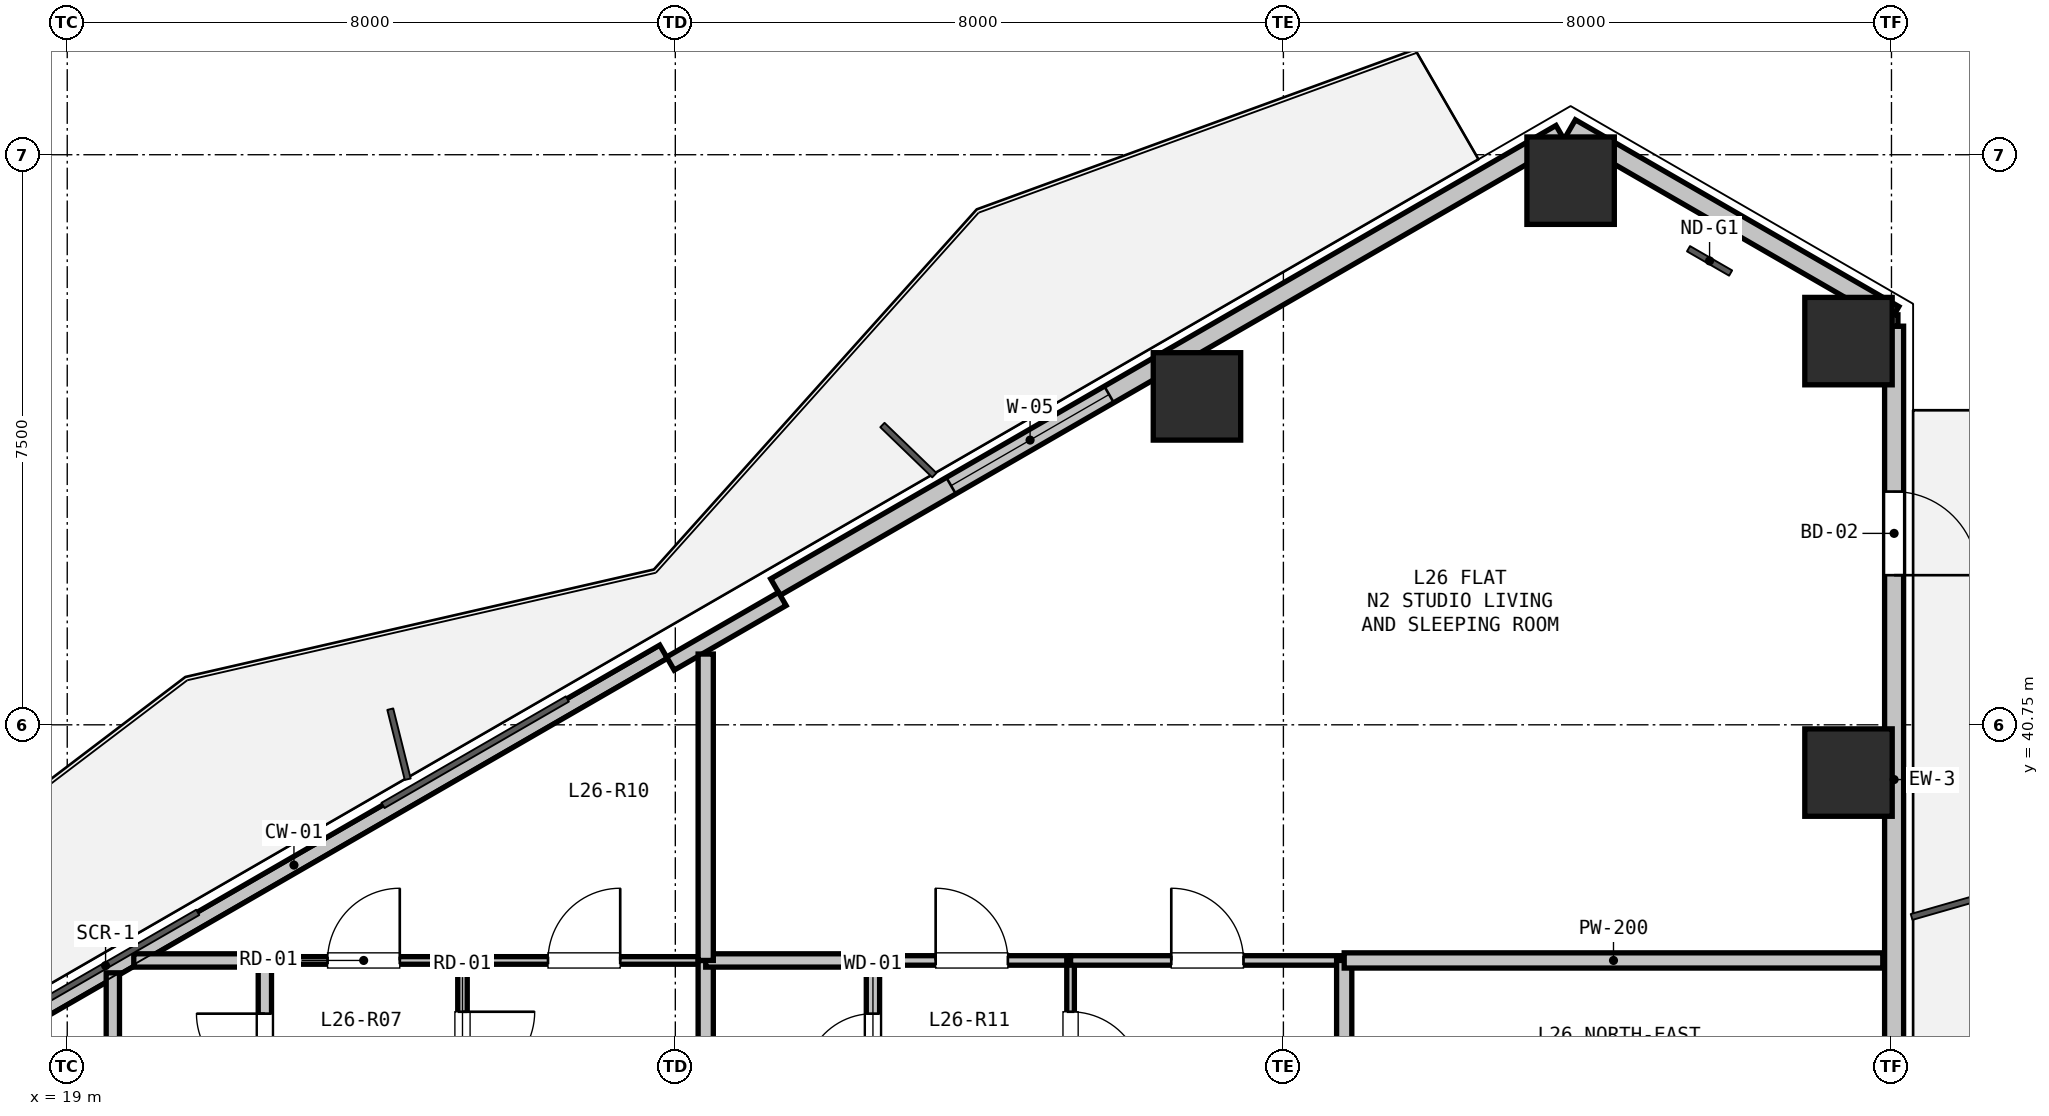
"""IFC4 building model, lengths in metres.
Left out: names, types, materials, properties, quantities, classifications, styles, units other than length and angle.
Written with IfcOpenShell. Run it as: python <this file> out.ifc"""

import sys

from ifc_helpers import new_model, si_unit, direction, frame, frame_2d, origin, origin_2d, place, context, subcontext, project, spatial, rectangle, hollow_rectangle, extrude, element, fill, save


model = new_model("IFC4")
c1 = context("Model", 3, precision=1e-05, world=origin(), true_north=direction((0.0, 1.0)))
c2 = subcontext(c1, "Body", "Model", "MODEL_VIEW")
j1 = project(units=[si_unit("LENGTHUNIT", "METRE"), si_unit("PLANEANGLEUNIT", "RADIAN")], contexts=[c1])
p1 = place(None, origin())
s1 = spatial("IfcSite", under=j1, at=p1, CompositionType="ELEMENT")
p2 = place(p1, origin())
s2 = spatial("IfcBuilding", under=s1, at=p2, CompositionType="ELEMENT")
p3 = place(p2, frame((0.0, 0.0, 96.6)))
s3 = spatial("IfcBuildingStorey", under=s2, at=p3, CompositionType="ELEMENT", Elevation=96.6)
for number, where, z_axis, x_axis in (
    (1, (33.863, 45.071, 0.0), (0.0, 0.0, 1.0), (1.0, 0.0, 0.0)),
    (2, (38.779, 47.909, 0.0), (0.0, 0.0, 1.0), (1.0, 0.0, 0.0)),
    (3, (42.435, 45.798, 0.0), (0.0, 0.0, 1.0), (1.0, 0.0, 0.0)),
    (4, (42.435, 40.122, 0.0), (0.0, 0.0, 1.0), (1.0, 0.0, 0.0)),
):
    element("IfcColumn", number, at=place(p3, frame(where, z_axis=z_axis, x_axis=x_axis)), inside=s3, PredefinedType="COLUMN", context=c2, shape_type="SweptSolid", body=[
        extrude(hollow_rectangle(XDim=1.15, YDim=1.15, WallThickness=0.032, at=origin_2d()), origin(), (0.0, 0.0, 1.0), 3.3),
    ])
p4 = place(p3, frame((38.779, 48.602, 0.0), z_axis=(0.0, 0.0, 1.0), x_axis=(0.866011848704, -0.500023477353, 0.0)))
e5 = element("IfcWall", 5, at=p4, inside=s3, PredefinedType="SOLIDWALL", context=c2, shape_type="SweptSolid", body=[
    extrude(rectangle(XDim=4.914, YDim=0.25, at=frame_2d((2.457, 0.0))), origin(), (0.0, 0.0, 1.0), 2.67),
])
p5 = place(p3, frame((17.12, 36.097, 0.0), z_axis=(0.0, 0.0, 1.0), x_axis=(0.866027010039, 0.499997217876, 0.0)))
e6 = element("IfcWall", 6, at=p5, inside=s3, PredefinedType="PARAPET", context=c2, shape_type="SweptSolid", body=[
    extrude(rectangle(XDim=11.229, YDim=0.2, at=frame_2d((5.615, 0.0))), origin(), (0.0, 0.0, 1.0), 0.2),
])
p6 = place(p3, frame((28.317, 42.562, 0.0), z_axis=(0.0, 0.0, 1.0), x_axis=(0.866023023012, 0.500004123596, 0.0)))
e7 = element("IfcWall", 7, at=p6, inside=s3, PredefinedType="SOLIDWALL", context=c2, shape_type="SweptSolid", body=[
    extrude(rectangle(XDim=11.93, YDim=0.25, at=frame_2d((5.965, 0.0))), origin(), (0.0, 0.0, 1.0), 2.67),
])
p7 = place(p6, frame((2.668, 0.0, 0.9)))
e8 = element("IfcOpeningElement", 8, at=p7, cuts=e7, PredefinedType="OPENING", context=c2, shape_type="SweptSolid", body=[
    extrude(rectangle(XDim=2.4, YDim=1.6, at=frame_2d((1.2, 0.8))), frame((0.0, 0.135, 0.0), z_axis=(0.0, -1.0, 0.0), x_axis=(1.0, 0.0, 0.0)), (0.0, 0.0, 1.0), 0.27),
])
p8 = place(p3, frame((26.935, 41.556, 0.0), z_axis=(0.0, 0.0, 1.0), x_axis=(0.86605165483, 0.499954529098, 0.0)))
e9 = element("IfcWall", 9, at=p8, inside=s3, PredefinedType="PARAPET", context=c2, shape_type="SweptSolid", body=[
    extrude(rectangle(XDim=1.7, YDim=0.2, at=frame_2d((0.85, 0.0))), origin(), (0.0, 0.0, 1.0), 2.67),
])
p9 = place(p3, frame((43.035, 45.994, 0.0), z_axis=(0.0, 0.0, 1.0), x_axis=(0.0, -1.0, 0.0)))
e10 = element("IfcWall", 10, at=p9, inside=s3, PredefinedType="SOLIDWALL", context=c2, shape_type="SweptSolid", body=[
    extrude(rectangle(XDim=11.93, YDim=0.25, at=frame_2d((5.965, 0.0))), origin(), (0.0, 0.0, 1.0), 2.67),
])
p10 = place(p9, frame((2.176, 0.0, 0.0)))
e11 = element("IfcOpeningElement", 11, at=p10, cuts=e10, PredefinedType="OPENING", context=c2, shape_type="SweptSolid", body=[
    extrude(rectangle(XDim=1.1, YDim=2.1, at=frame_2d((0.55, 1.05))), frame((0.0, 0.135, 0.0), z_axis=(0.0, -1.0, 0.0), x_axis=(1.0, 0.0, 0.0)), (0.0, 0.0, 1.0), 0.27),
])
p11 = place(p3, frame((21.6, 37.65, 0.0), z_axis=(0.0, 0.0, 1.0), x_axis=(1.0, 0.0, 0.0)))
e12 = element("IfcWall", 12, at=p11, inside=s3, PredefinedType="PARTITIONING", context=c2, shape_type="SweptSolid", body=[
    extrude(rectangle(XDim=2.6, YDim=0.1, at=frame_2d((1.3, 0.0))), origin(), (0.0, 0.0, 1.0), 3.05),
])
p12 = place(p11, frame((0.825, 0.0, 0.0)))
e13 = element("IfcOpeningElement", 13, at=p12, cuts=e12, PredefinedType="OPENING", context=c2, shape_type="SweptSolid", body=[
    extrude(rectangle(XDim=0.95, YDim=2.1, at=frame_2d((0.475, 1.05))), frame((0.0, 0.06, 0.0), z_axis=(0.0, -1.0, 0.0), x_axis=(1.0, 0.0, 0.0)), (0.0, 0.0, 1.0), 0.12),
])
p13 = place(p3, frame((24.2, 37.65, 0.0), z_axis=(0.0, 0.0, 1.0), x_axis=(0.0, -1.0, 0.0)))
e14 = element("IfcWall", 14, at=p13, inside=s3, PredefinedType="PARTITIONING", context=c2, shape_type="SweptSolid", body=[
    extrude(rectangle(XDim=2.3, YDim=0.125, at=frame_2d((1.15, 0.0))), origin(), (0.0, 0.0, 1.0), 3.05),
])
p14 = place(p13, frame((0.675, 0.0, 0.0)))
e15 = element("IfcOpeningElement", 15, at=p14, cuts=e14, PredefinedType="OPENING", context=c2, shape_type="SweptSolid", body=[
    extrude(rectangle(XDim=0.95, YDim=2.1, at=frame_2d((0.475, 1.05))), frame((0.0, 0.073, 0.0), z_axis=(0.0, -1.0, 0.0), x_axis=(1.0, 0.0, 0.0)), (0.0, 0.0, 1.0), 0.145),
])
p15 = place(p3, frame((21.6, 35.35, 0.0), z_axis=(0.0, 0.0, 1.0), x_axis=(0.0, 1.0, 0.0)))
e16 = element("IfcWall", 16, at=p15, inside=s3, PredefinedType="PLUMBINGWALL", context=c2, shape_type="SweptSolid", body=[
    extrude(rectangle(XDim=2.3, YDim=0.175, at=frame_2d((1.15, 0.0))), origin(), (0.0, 0.0, 1.0), 3.05),
])
p16 = place(p15, frame((0.7, 0.0, 0.0)))
e17 = element("IfcOpeningElement", 17, at=p16, cuts=e16, PredefinedType="OPENING", context=c2, shape_type="SweptSolid", body=[
    extrude(rectangle(XDim=0.9, YDim=2.1, at=frame_2d((0.45, 1.05))), frame((0.0, 0.097, 0.0), z_axis=(0.0, -1.0, 0.0), x_axis=(1.0, 0.0, 0.0)), (0.0, 0.0, 1.0), 0.195),
])
p17 = place(p3, frame((29.6, 37.65, 0.0), z_axis=(0.0, 0.0, 1.0), x_axis=(1.0, 0.0, 0.0)))
e18 = element("IfcWall", 18, at=p17, inside=s3, PredefinedType="PARTITIONING", context=c2, shape_type="SweptSolid", body=[
    extrude(rectangle(XDim=2.6, YDim=0.125, at=frame_2d((1.3, 0.0))), origin(), (0.0, 0.0, 1.0), 3.05),
])
p18 = place(p17, frame((0.825, 0.0, 0.0)))
e19 = element("IfcOpeningElement", 19, at=p18, cuts=e18, PredefinedType="OPENING", context=c2, shape_type="SweptSolid", body=[
    extrude(rectangle(XDim=0.95, YDim=2.1, at=frame_2d((0.475, 1.05))), frame((0.0, 0.073, 0.0), z_axis=(0.0, -1.0, 0.0), x_axis=(1.0, 0.0, 0.0)), (0.0, 0.0, 1.0), 0.145),
])
p19 = place(p3, frame((32.2, 37.65, 0.0), z_axis=(0.0, 0.0, 1.0), x_axis=(0.0, -1.0, 0.0)))
e20 = element("IfcWall", 20, at=p19, inside=s3, PredefinedType="PARTITIONING", context=c2, shape_type="SweptSolid", body=[
    extrude(rectangle(XDim=2.3, YDim=0.1, at=frame_2d((1.15, 0.0))), origin(), (0.0, 0.0, 1.0), 3.05),
])
p20 = place(p19, frame((0.675, 0.0, 0.0)))
e21 = element("IfcOpeningElement", 21, at=p20, cuts=e20, PredefinedType="OPENING", context=c2, shape_type="SweptSolid", body=[
    extrude(rectangle(XDim=0.95, YDim=2.1, at=frame_2d((0.475, 1.05))), frame((0.0, 0.06, 0.0), z_axis=(0.0, -1.0, 0.0), x_axis=(1.0, 0.0, 0.0)), (0.0, 0.0, 1.0), 0.12),
])
p21 = place(p3, frame((29.6, 35.35, 0.0), z_axis=(0.0, 0.0, 1.0), x_axis=(0.0, 1.0, 0.0)))
e22 = element("IfcWall", 22, at=p21, inside=s3, PredefinedType="PLUMBINGWALL", context=c2, shape_type="SweptSolid", body=[
    extrude(rectangle(XDim=2.3, YDim=0.175, at=frame_2d((1.15, 0.0))), origin(), (0.0, 0.0, 1.0), 3.05),
])
p22 = place(p21, frame((0.7, 0.0, 0.0)))
e23 = element("IfcOpeningElement", 23, at=p22, cuts=e22, PredefinedType="OPENING", context=c2, shape_type="SweptSolid", body=[
    extrude(rectangle(XDim=0.9, YDim=2.1, at=frame_2d((0.45, 1.05))), frame((0.0, 0.097, 0.0), z_axis=(0.0, -1.0, 0.0), x_axis=(1.0, 0.0, 0.0)), (0.0, 0.0, 1.0), 0.195),
])
p23 = place(p3, frame((19.6, 35.35, 0.0), z_axis=(0.0, 0.0, 1.0), x_axis=(0.0, 1.0, 0.0)))
e24 = element("IfcWall", 24, at=p23, inside=s3, PredefinedType="PLUMBINGWALL", context=c2, shape_type="SweptSolid", body=[
    extrude(rectangle(XDim=2.137, YDim=0.175, at=frame_2d((1.068, 0.0))), origin(), (0.0, 0.0, 1.0), 2.365),
])
p24 = place(p3, frame((19.875, 37.65, 0.0), z_axis=(0.0, 0.0, 1.0), x_axis=(1.0, 0.0, 0.0)))
e25 = element("IfcWall", 25, at=p24, inside=s3, PredefinedType="PLUMBINGWALL", context=c2, shape_type="SweptSolid", body=[
    extrude(rectangle(XDim=1.725, YDim=0.175, at=frame_2d((0.862, 0.0))), origin(), (0.0, 0.0, 1.0), 2.365),
])
p25 = place(p3, frame((24.2, 37.65, 0.0), z_axis=(0.0, 0.0, 1.0), x_axis=(1.0, 0.0, 0.0)))
e26 = element("IfcWall", 26, at=p25, inside=s3, PredefinedType="PARTITIONING", context=c2, shape_type="SweptSolid", body=[
    extrude(rectangle(XDim=3.2, YDim=0.1, at=frame_2d((1.6, 0.0))), origin(), (0.0, 0.0, 1.0), 3.05),
])
p26 = place(p25, frame((1.125, 0.0, 0.0)))
e27 = element("IfcOpeningElement", 27, at=p26, cuts=e26, PredefinedType="OPENING", context=c2, shape_type="SweptSolid", body=[
    extrude(rectangle(XDim=0.95, YDim=2.1, at=frame_2d((0.475, 1.05))), frame((0.0, 0.06, 0.0), z_axis=(0.0, -1.0, 0.0), x_axis=(1.0, 0.0, 0.0)), (0.0, 0.0, 1.0), 0.12),
])
p27 = place(p3, frame((27.4, 37.65, 0.0), z_axis=(0.0, 0.0, 1.0), x_axis=(0.0, -1.0, 0.0)))
e28 = element("IfcWall", 28, at=p27, inside=s3, PredefinedType="PARTITIONING", context=c2, shape_type="SweptSolid", body=[
    extrude(rectangle(XDim=2.3, YDim=0.2, at=frame_2d((1.15, 0.0))), origin(), (0.0, 0.0, 1.0), 3.05),
])
p28 = place(p3, frame((27.4, 37.65, 0.0), z_axis=(0.0, 0.0, 1.0), x_axis=(1.0, 0.0, 0.0)))
e29 = element("IfcWall", 29, at=p28, inside=s3, PredefinedType="PLUMBINGWALL", context=c2, shape_type="SweptSolid", body=[
    extrude(rectangle(XDim=2.2, YDim=0.175, at=frame_2d((1.1, 0.0))), origin(), (0.0, 0.0, 1.0), 3.05),
])
p29 = place(p3, frame((32.2, 37.65, 0.0), z_axis=(0.0, 0.0, 1.0), x_axis=(1.0, 0.0, 0.0)))
e30 = element("IfcWall", 30, at=p29, inside=s3, PredefinedType="PARTITIONING", context=c2, shape_type="SweptSolid", body=[
    extrude(rectangle(XDim=3.6, YDim=0.125, at=frame_2d((1.8, 0.0))), origin(), (0.0, 0.0, 1.0), 3.05),
])
p30 = place(p29, frame((1.325, 0.0, 0.0)))
e31 = element("IfcOpeningElement", 31, at=p30, cuts=e30, PredefinedType="OPENING", context=c2, shape_type="SweptSolid", body=[
    extrude(rectangle(XDim=0.95, YDim=2.1, at=frame_2d((0.475, 1.05))), frame((0.0, 0.073, 0.0), z_axis=(0.0, -1.0, 0.0), x_axis=(1.0, 0.0, 0.0)), (0.0, 0.0, 1.0), 0.145),
])
p31 = place(p3, frame((35.8, 37.65, 0.0), z_axis=(0.0, 0.0, 1.0), x_axis=(0.0, -1.0, 0.0)))
e32 = element("IfcWall", 32, at=p31, inside=s3, PredefinedType="PARTITIONING", context=c2, shape_type="SweptSolid", body=[
    extrude(rectangle(XDim=2.3, YDim=0.2, at=frame_2d((1.15, 0.0))), origin(), (0.0, 0.0, 1.0), 3.05),
])
p32 = place(p3, frame((35.8, 37.65, 0.0), z_axis=(0.0, 0.0, 1.0), x_axis=(1.0, 0.0, 0.0)))
e33 = element("IfcWall", 33, at=p32, inside=s3, PredefinedType="PARTITIONING", context=c2, shape_type="SweptSolid", body=[
    extrude(rectangle(XDim=7.085, YDim=0.2, at=frame_2d((3.543, 0.0))), origin(), (0.0, 0.0, 1.0), 2.365),
])
p33 = place(p3, frame((27.4, 41.681, 0.0), z_axis=(0.0, 0.0, 1.0), x_axis=(0.0, -1.0, 0.0)))
e34 = element("IfcWall", 34, at=p33, inside=s3, PredefinedType="PARTITIONING", context=c2, shape_type="SweptSolid", body=[
    extrude(rectangle(XDim=4.031, YDim=0.2, at=frame_2d((2.016, 0.0))), origin(), (0.0, 0.0, 1.0), 2.365),
])
p34 = place(p3, frame((43.035, 46.144, 0.0), z_axis=(0.0, 0.0, 1.0), x_axis=(0.0, -1.0, 0.0)))
e35 = element("IfcWall", 35, at=p34, inside=s3, PredefinedType="PARTITIONING", context=c2, shape_type="SweptSolid", body=[
    extrude(rectangle(XDim=0.15, YDim=0.1, at=frame_2d((0.075, 0.0))), origin(), (0.0, 0.0, 1.0), 3.05),
])
p35 = place(p7, origin())
e36 = element("IfcWindow", 36, at=p35, inside=s3, PartitioningType="SINGLE_PANEL", PredefinedType="WINDOW", context=c2, shape_type="SweptSolid", body=[
    extrude(rectangle(XDim=2.4, YDim=1.6, at=frame_2d((1.2, 0.8))), frame((0.0, 0.03, 0.0), z_axis=(0.0, -1.0, 0.0), x_axis=(1.0, 0.0, 0.0)), (0.0, 0.0, 1.0), 0.06),
])
fill(e8, e36)
p36 = place(p10, origin())
e37 = element("IfcDoor", 37, at=p36, inside=s3, OperationType="SINGLE_SWING_RIGHT", PredefinedType="DOOR", context=c2, shape_type="SweptSolid", body=[
    extrude(rectangle(XDim=1.1, YDim=2.1, at=frame_2d((0.55, 1.05))), frame((0.0, 0.025, 0.0), z_axis=(0.0, -1.0, 0.0), x_axis=(1.0, 0.0, 0.0)), (0.0, 0.0, 1.0), 0.05),
])
fill(e11, e37)
p37 = place(p16, origin())
e38 = element("IfcDoor", 38, at=p37, inside=s3, OperationType="SINGLE_SWING_RIGHT", PredefinedType="DOOR", context=c2, shape_type="SweptSolid", body=[
    extrude(rectangle(XDim=0.9, YDim=2.1, at=frame_2d((0.45, 1.05))), frame((0.0, 0.025, 0.0), z_axis=(0.0, -1.0, 0.0), x_axis=(1.0, 0.0, 0.0)), (0.0, 0.0, 1.0), 0.05),
])
fill(e17, e38)
p38 = place(p14, origin())
e39 = element("IfcDoor", 39, at=p38, inside=s3, OperationType="SINGLE_SWING_LEFT", PredefinedType="DOOR", context=c2, shape_type="SweptSolid", body=[
    extrude(rectangle(XDim=0.95, YDim=2.1, at=frame_2d((0.475, 1.05))), frame((0.0, 0.025, 0.0), z_axis=(0.0, -1.0, 0.0), x_axis=(1.0, 0.0, 0.0)), (0.0, 0.0, 1.0), 0.05),
])
fill(e15, e39)
p39 = place(p12, origin())
e40 = element("IfcDoor", 40, at=p39, inside=s3, OperationType="SINGLE_SWING_RIGHT", PredefinedType="DOOR", context=c2, shape_type="SweptSolid", body=[
    extrude(rectangle(XDim=0.95, YDim=2.1, at=frame_2d((0.475, 1.05))), frame((0.0, 0.025, 0.0), z_axis=(0.0, -1.0, 0.0), x_axis=(1.0, 0.0, 0.0)), (0.0, 0.0, 1.0), 0.05),
])
fill(e13, e40)
p40 = place(p22, origin())
e41 = element("IfcDoor", 41, at=p40, inside=s3, OperationType="SINGLE_SWING_LEFT", PredefinedType="DOOR", context=c2, shape_type="SweptSolid", body=[
    extrude(rectangle(XDim=0.9, YDim=2.1, at=frame_2d((0.45, 1.05))), frame((0.0, 0.025, 0.0), z_axis=(0.0, -1.0, 0.0), x_axis=(1.0, 0.0, 0.0)), (0.0, 0.0, 1.0), 0.05),
])
fill(e23, e41)
p41 = place(p20, origin())
e42 = element("IfcDoor", 42, at=p41, inside=s3, OperationType="SINGLE_SWING_RIGHT", PredefinedType="DOOR", context=c2, shape_type="SweptSolid", body=[
    extrude(rectangle(XDim=0.95, YDim=2.1, at=frame_2d((0.475, 1.05))), frame((0.0, 0.025, 0.0), z_axis=(0.0, -1.0, 0.0), x_axis=(1.0, 0.0, 0.0)), (0.0, 0.0, 1.0), 0.05),
])
fill(e21, e42)
p42 = place(p18, origin())
e43 = element("IfcDoor", 43, at=p42, inside=s3, OperationType="SINGLE_SWING_LEFT", PredefinedType="DOOR", context=c2, shape_type="SweptSolid", body=[
    extrude(rectangle(XDim=0.95, YDim=2.1, at=frame_2d((0.475, 1.05))), frame((0.0, 0.025, 0.0), z_axis=(0.0, -1.0, 0.0), x_axis=(1.0, 0.0, 0.0)), (0.0, 0.0, 1.0), 0.05),
])
fill(e19, e43)
p43 = place(p26, origin())
e44 = element("IfcDoor", 44, at=p43, inside=s3, OperationType="SINGLE_SWING_RIGHT", PredefinedType="DOOR", context=c2, shape_type="SweptSolid", body=[
    extrude(rectangle(XDim=0.95, YDim=2.1, at=frame_2d((0.475, 1.05))), frame((0.0, 0.025, 0.0), z_axis=(0.0, -1.0, 0.0), x_axis=(1.0, 0.0, 0.0)), (0.0, 0.0, 1.0), 0.05),
])
fill(e27, e44)
p44 = place(p30, origin())
e45 = element("IfcDoor", 45, at=p44, inside=s3, OperationType="SINGLE_SWING_LEFT", PredefinedType="DOOR", context=c2, shape_type="SweptSolid", body=[
    extrude(rectangle(XDim=0.95, YDim=2.1, at=frame_2d((0.475, 1.05))), frame((0.0, 0.025, 0.0), z_axis=(0.0, -1.0, 0.0), x_axis=(1.0, 0.0, 0.0)), (0.0, 0.0, 1.0), 0.05),
])
fill(e31, e45)
save(model, sys.argv[1])
